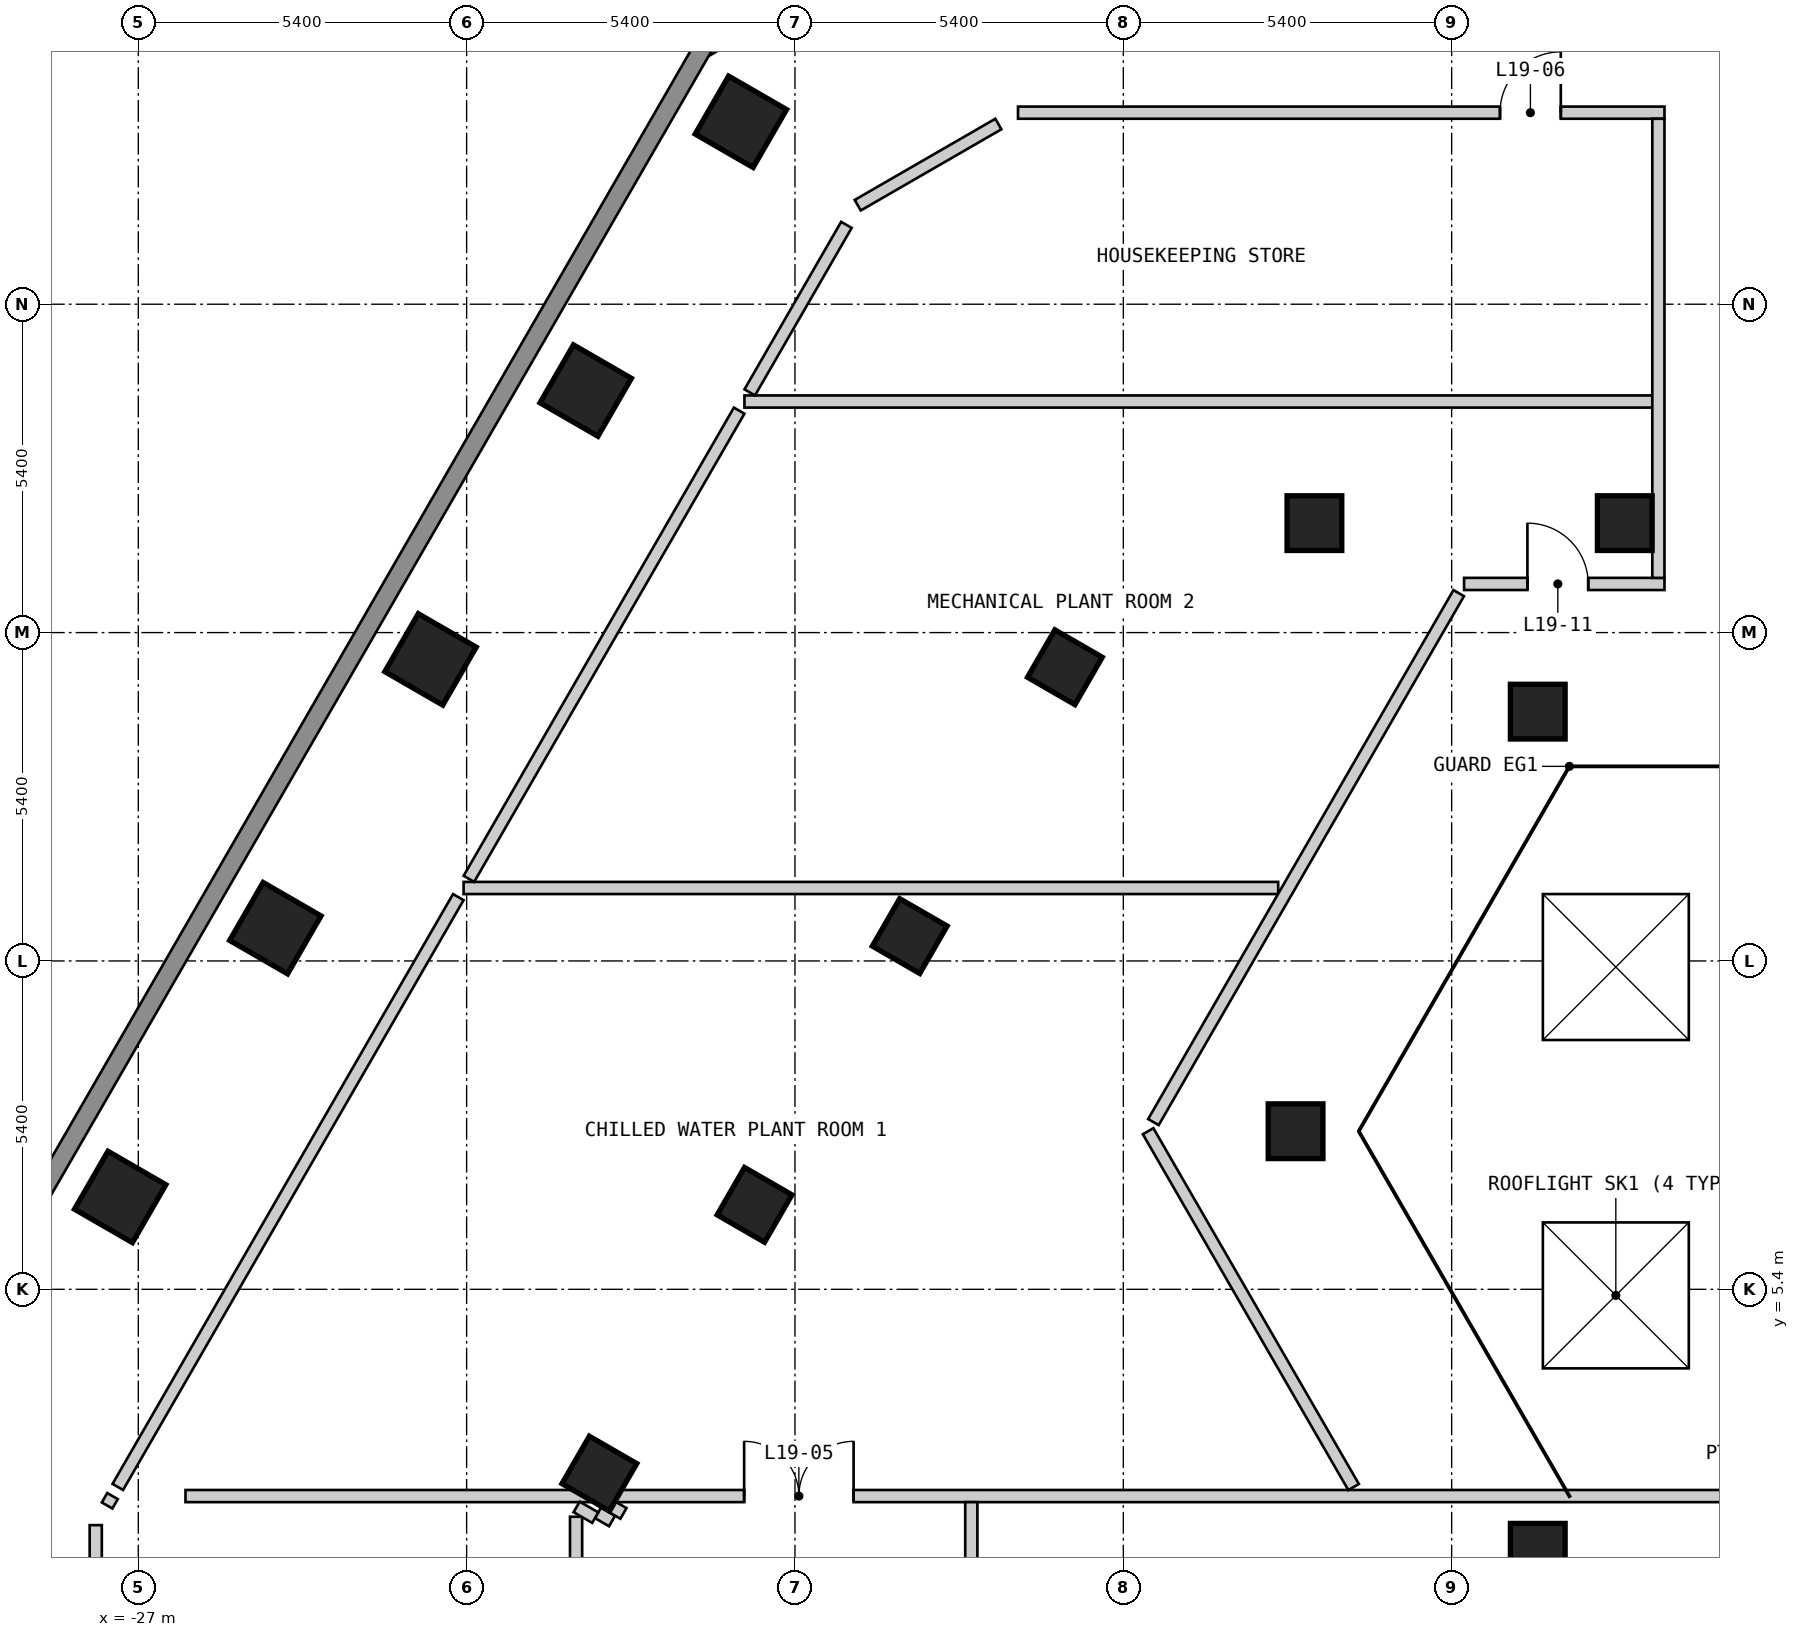
"""IFC4 building model, lengths in metres.
Left out: names, types, materials, properties, quantities, classifications, styles, units other than length and angle.
Written with IfcOpenShell. Run it as: python <this file> out.ifc"""

import sys

from ifc_helpers import new_model, si_unit, direction, frame, frame_2d, origin, origin_2d, place, context, subcontext, project, spatial, polyline, rectangle, outline, extrude, element, fill, save


model = new_model("IFC4")
c1 = context("Model", 3, precision=1e-05, world=origin(), true_north=direction((0.0, 1.0)))
c2 = subcontext(c1, "Body", "Model", "MODEL_VIEW")
j1 = project(units=[si_unit("LENGTHUNIT", "METRE"), si_unit("PLANEANGLEUNIT", "RADIAN")], contexts=[c1])
p1 = place(None, origin())
s1 = spatial("IfcSite", under=j1, at=p1, CompositionType="ELEMENT")
p2 = place(p1, origin())
s2 = spatial("IfcBuilding", under=s1, at=p2, CompositionType="ELEMENT")
p3 = place(p2, frame((0.0, 0.0, 62.4)))
s3 = spatial("IfcBuildingStorey", under=s2, at=p3, CompositionType="ELEMENT", Elevation=62.4)
for number, where, z_axis, x_axis in (
    (1, (-17.09, 24.6, 0.0), (0.0, 0.0, 1.0), (-0.5, -0.866, 0.0)),
    (2, (-19.642, 20.18, 0.0), (0.0, 0.0, 1.0), (-0.5, -0.866, 0.0)),
    (3, (-22.194, 15.759, 0.0), (0.0, 0.0, 1.0), (-0.5, -0.866, 0.0)),
    (4, (-24.746, 11.339, 0.0), (0.0, 0.0, 1.0), (-0.5, -0.866, 0.0)),
    (5, (-27.298, 6.919, 0.0), (0.0, 0.0, 1.0), (-0.5, -0.866, 0.0)),
):
    element("IfcColumn", number, at=place(p3, frame(where, z_axis=z_axis, x_axis=x_axis)), inside=s3, PredefinedType="COLUMN", context=c2, shape_type="SweptSolid", body=[
        extrude(rectangle(XDim=1.1, YDim=1.1, at=origin_2d()), origin(), (0.0, 0.0, 1.0), 3.6),
    ])
p4 = place(p3, frame((-2.553, 18.0, 0.0), z_axis=(0.0, 0.0, 1.0), x_axis=(-1.0, 0.0, 0.0)))
e6 = element("IfcColumn", 6, at=p4, inside=s3, PredefinedType="COLUMN", context=c2, shape_type="SweptSolid", body=[
    extrude(rectangle(XDim=0.9, YDim=0.9, at=origin_2d()), origin(), (0.0, 0.0, 1.0), 2.6),
])
for number, where, z_axis, x_axis in (
    (7, (-3.984, 14.9, 0.0), (0.0, 0.0, 1.0), (1.0, 0.0, 0.0)),
    (8, (-7.657, 18.0, 0.0), (0.0, 0.0, 1.0), (-1.0, 0.0, 0.0)),
    (9, (-11.761, 15.63, 0.0), (0.0, 0.0, 1.0), (-0.5, -0.866, 0.0)),
    (10, (-7.967, 8.0, 0.0), (0.0, 0.0, 1.0), (1.0, 0.0, 0.0)),
    (11, (-14.313, 11.209, 0.0), (0.0, 0.0, 1.0), (-0.5, -0.866, 0.0)),
    (12, (-16.865, 6.789, 0.0), (0.0, 0.0, 1.0), (-0.5, -0.866, 0.0)),
    (13, (-3.984, 1.1, 0.0), (0.0, 0.0, 1.0), (1.0, 0.0, 0.0)),
    (14, (-19.417, 2.369, 0.0), (0.0, 0.0, 1.0), (-0.5, -0.866, 0.0)),
):
    element("IfcColumn", number, at=place(p3, frame(where, z_axis=z_axis, x_axis=x_axis)), inside=s3, PredefinedType="COLUMN", context=c2, shape_type="SweptSolid", body=[
        extrude(rectangle(XDim=0.9, YDim=0.9, at=origin_2d()), origin(), (0.0, 0.0, 1.0), 3.6),
    ])
p5 = place(p3, frame((-13.435, 28.27, 0.0), z_axis=(0.0, 0.0, 1.0), x_axis=(-0.866010750942, -0.50002537861, 0.0)))
e15 = element("IfcWall", 15, at=p5, inside=s3, PredefinedType="SOLIDWALL", context=c2, shape_type="SweptSolid", body=[
    extrude(outline(polyline([(0.0, -0.15), (5.0, -0.15), (4.919, 0.15), (0.08, 0.15), (0.0, -0.15)])), origin(), (0.0, 0.0, 1.0), 2.6),
])
p6 = place(p3, frame((-17.71, 25.825, 0.0), z_axis=(0.0, 0.0, 1.0), x_axis=(-0.500001938803, -0.866024284413, 0.0)))
e16 = element("IfcWall", 16, at=p6, inside=s3, PredefinedType="SOLIDWALL", context=c2, shape_type="SweptSolid", body=[
    extrude(outline(polyline([(0.0, -0.15), (27.02, -0.15), (26.94, 0.15), (0.08, 0.15), (0.0, -0.15)])), origin(), (0.0, 0.0, 1.0), 2.6),
])
p7 = place(p3, frame((-26.224, 2.0, 0.0), z_axis=(0.0, 0.0, 1.0), x_axis=(1.0, 0.0, 0.0)))
e17 = element("IfcWall", 17, at=p7, inside=s3, PredefinedType="SOLIDWALL", context=c2, shape_type="SweptSolid", body=[
    extrude(rectangle(XDim=53.248, YDim=0.2, at=frame_2d((26.624, 0.0))), origin(), (0.0, 0.0, 1.0), 2.6),
])
p8 = place(p7, frame((9.188, 0.0, 0.0)))
e18 = element("IfcOpeningElement", 18, at=p8, cuts=e17, PredefinedType="OPENING", context=c2, shape_type="SweptSolid", body=[
    extrude(rectangle(XDim=1.8, YDim=2.1, at=frame_2d((0.9, 1.05))), frame((0.0, 0.11, 0.0), z_axis=(0.0, -1.0, 0.0), x_axis=(1.0, 0.0, 0.0)), (0.0, 0.0, 1.0), 0.22),
])
p9 = place(p7, frame((40.124, 0.0, 0.0)))
e19 = element("IfcOpeningElement", 19, at=p9, cuts=e17, PredefinedType="OPENING", context=c2, shape_type="SweptSolid", body=[
    extrude(rectangle(XDim=1.0, YDim=2.1, at=frame_2d((0.5, 1.05))), frame((0.0, 0.11, 0.0), z_axis=(0.0, -1.0, 0.0), x_axis=(1.0, 0.0, 0.0)), (0.0, 0.0, 1.0), 0.22),
])
p10 = place(p7, frame((30.811, 0.0, 0.0)))
e20 = element("IfcOpeningElement", 20, at=p10, cuts=e17, PredefinedType="OPENING", context=c2, shape_type="SweptSolid", body=[
    extrude(rectangle(XDim=1.8, YDim=2.1, at=frame_2d((0.9, 1.05))), frame((0.0, 0.11, 0.0), z_axis=(0.0, -1.0, 0.0), x_axis=(1.0, 0.0, 0.0)), (0.0, 0.0, 1.0), 0.22),
])
p11 = place(p3, frame((-21.65, 12.0, 0.0), z_axis=(0.0, 0.0, 1.0), x_axis=(1.0, 0.0, 0.0)))
e21 = element("IfcWall", 21, at=p11, inside=s3, PredefinedType="SOLIDWALL", context=c2, shape_type="SweptSolid", body=[
    extrude(rectangle(XDim=13.397, YDim=0.2, at=frame_2d((6.698, 0.0))), origin(), (0.0, 0.0, 1.0), 2.6),
])
p12 = place(p3, frame((-5.196, 17.0, 0.0), z_axis=(0.0, 0.0, 1.0), x_axis=(1.0, 0.0, 0.0)))
e22 = element("IfcWall", 22, at=p12, inside=s3, PredefinedType="SOLIDWALL", context=c2, shape_type="SweptSolid", body=[
    extrude(rectangle(XDim=3.296, YDim=0.2, at=frame_2d((1.648, 0.0))), origin(), (0.0, 0.0, 1.0), 2.6),
])
p13 = place(p12, frame((1.042, 0.0, 0.0)))
e23 = element("IfcOpeningElement", 23, at=p13, cuts=e22, PredefinedType="OPENING", context=c2, shape_type="SweptSolid", body=[
    extrude(rectangle(XDim=1.0, YDim=2.1, at=frame_2d((0.5, 1.05))), frame((0.0, 0.11, 0.0), z_axis=(0.0, -1.0, 0.0), x_axis=(1.0, 0.0, 0.0)), (0.0, 0.0, 1.0), 0.22),
])
p14 = place(p3, frame((-17.031, 20.0, 0.0), z_axis=(0.0, 0.0, 1.0), x_axis=(1.0, 0.0, 0.0)))
e24 = element("IfcWall", 24, at=p14, inside=s3, PredefinedType="SOLIDWALL", context=c2, shape_type="SweptSolid", body=[
    extrude(rectangle(XDim=14.931, YDim=0.2, at=frame_2d((7.465, 0.0))), origin(), (0.0, 0.0, 1.0), 2.6),
])
p15 = place(p3, frame((-12.532, 24.75, 0.0), z_axis=(0.0, 0.0, 1.0), x_axis=(1.0, 0.0, 0.0)))
e25 = element("IfcWall", 25, at=p15, inside=s3, PredefinedType="PARTITIONING", context=c2, shape_type="SweptSolid", body=[
    extrude(rectangle(XDim=10.632, YDim=0.2, at=frame_2d((5.316, 0.0))), origin(), (0.0, 0.0, 1.0), 2.6),
])
p16 = place(p15, frame((8.927, 0.0, 0.0), z_axis=(0.0, 0.0, 1.0), x_axis=(-1.0, 0.0, 0.0)))
e26 = element("IfcOpeningElement", 26, at=p16, cuts=e25, PredefinedType="OPENING", context=c2, shape_type="SweptSolid", body=[
    extrude(rectangle(XDim=1.0, YDim=2.1, at=frame_2d((0.5, 1.05))), frame((0.0, 0.11, 0.0), z_axis=(0.0, -1.0, 0.0), x_axis=(1.0, 0.0, 0.0)), (0.0, 0.0, 1.0), 0.22),
])
p17 = place(p3, frame((-27.7, -1.522, 0.0), z_axis=(0.0, 0.0, 1.0), x_axis=(0.0, 1.0, 0.0)))
e27 = element("IfcWall", 27, at=p17, inside=s3, PredefinedType="SOLIDWALL", context=c2, shape_type="SweptSolid", body=[
    extrude(rectangle(XDim=3.044, YDim=0.2, at=frame_2d((1.522, 0.0))), origin(), (0.0, 0.0, 1.0), 2.6),
])
p18 = place(p3, frame((-19.8, -8.9, 0.0), z_axis=(0.0, 0.0, 1.0), x_axis=(0.0, 1.0, 0.0)))
e28 = element("IfcWall", 28, at=p18, inside=s3, PredefinedType="SOLIDWALL", context=c2, shape_type="SweptSolid", body=[
    extrude(rectangle(XDim=10.56, YDim=0.2, at=frame_2d((5.28, 0.0))), origin(), (0.0, 0.0, 1.0), 2.6),
])
p19 = place(p18, frame((4.657, 0.0, 0.0)))
e29 = element("IfcOpeningElement", 29, at=p19, cuts=e28, PredefinedType="OPENING", context=c2, shape_type="SweptSolid", body=[
    extrude(rectangle(XDim=1.0, YDim=2.1, at=frame_2d((0.5, 1.05))), frame((0.0, 0.11, 0.0), z_axis=(0.0, -1.0, 0.0), x_axis=(1.0, 0.0, 0.0)), (0.0, 0.0, 1.0), 0.22),
])
p20 = place(p3, frame((-13.3, -4.88, 0.0), z_axis=(0.0, 0.0, 1.0), x_axis=(0.0, 1.0, 0.0)))
e30 = element("IfcWall", 30, at=p20, inside=s3, PredefinedType="PARTITIONING", context=c2, shape_type="SweptSolid", body=[
    extrude(rectangle(XDim=6.78, YDim=0.2, at=frame_2d((3.39, 0.0))), origin(), (0.0, 0.0, 1.0), 2.6),
])
p21 = place(p3, frame((-2.0, 17.1, 0.0), z_axis=(0.0, 0.0, 1.0), x_axis=(0.0, 1.0, 0.0)))
e31 = element("IfcWall", 31, at=p21, inside=s3, PredefinedType="SOLIDWALL", context=c2, shape_type="SweptSolid", body=[
    extrude(rectangle(XDim=7.55, YDim=0.2, at=frame_2d((3.775, 0.0))), origin(), (0.0, 0.0, 1.0), 2.6),
])
p22 = place(p3, frame((-19.44, 1.724, 0.0), z_axis=(0.0, 0.0, 1.0), x_axis=(0.865821204386, -0.500353517061, 0.0)))
e32 = element("IfcWall", 32, at=p22, inside=s3, PredefinedType="SOLIDWALL", context=c2, shape_type="SweptSolid", body=[
    extrude(rectangle(XDim=0.268, YDim=0.2, at=frame_2d((0.134, 0.0))), origin(), (0.0, 0.0, 1.0), 2.6),
])
p23 = place(p3, frame((-19.791, 1.822, 0.0), z_axis=(0.0, 0.0, 1.0), x_axis=(0.865552376308, -0.500818414065, 0.0)))
e33 = element("IfcWall", 33, at=p23, inside=s3, PredefinedType="SOLIDWALL", context=c2, shape_type="SweptSolid", body=[
    extrude(rectangle(XDim=0.354, YDim=0.2, at=frame_2d((0.177, 0.0))), origin(), (0.0, 0.0, 1.0), 2.6),
])
p24 = place(p3, frame((-10.392, 8.0, 0.0), z_axis=(0.0, 0.0, 1.0), x_axis=(0.500051862572, -0.865995458844, 0.0)))
e34 = element("IfcWall", 34, at=p24, inside=s3, PredefinedType="SOLIDWALL", context=c2, shape_type="SweptSolid", body=[
    extrude(rectangle(XDim=6.758, YDim=0.2, at=frame_2d((3.379, 0.0))), origin(), (0.0, 0.0, 1.0), 2.6),
])
p25 = place(p3, frame((-15.168, 23.228, 0.0), z_axis=(0.0, 0.0, 1.0), x_axis=(0.866097299559, 0.499875452184, 0.0)))
e35 = element("IfcWall", 35, at=p25, inside=s3, PredefinedType="PARTITIONING", context=c2, shape_type="SweptSolid", body=[
    extrude(rectangle(XDim=2.671, YDim=0.2, at=frame_2d((1.335, 0.0))), origin(), (0.0, 0.0, 1.0), 2.6),
])
p26 = place(p3, frame((-10.305, 8.15, 0.0), z_axis=(0.0, 0.0, 1.0), x_axis=(0.49988797692, 0.86609007068, 0.0)))
e36 = element("IfcWall", 36, at=p26, inside=s3, PredefinedType="SOLIDWALL", context=c2, shape_type="SweptSolid", body=[
    extrude(rectangle(XDim=10.044, YDim=0.2, at=frame_2d((5.022, 0.0))), origin(), (0.0, 0.0, 1.0), 2.6),
])
p27 = place(p3, frame((-27.513, 1.845, 0.0), z_axis=(0.0, 0.0, 1.0), x_axis=(0.497315560673, 0.867569728098, 0.0)))
e37 = element("IfcWall", 37, at=p27, inside=s3, PredefinedType="SOLIDWALL", context=c2, shape_type="SweptSolid", body=[
    extrude(rectangle(XDim=0.179, YDim=0.2, at=frame_2d((0.089, 0.0))), origin(), (0.0, 0.0, 1.0), 2.6),
])
p28 = place(p3, frame((-27.337, 2.15, 0.0), z_axis=(0.0, 0.0, 1.0), x_axis=(0.499962711661, 0.866046931147, 0.0)))
e38 = element("IfcWall", 38, at=p28, inside=s3, PredefinedType="SOLIDWALL", context=c2, shape_type="SweptSolid", body=[
    extrude(rectangle(XDim=11.2, YDim=0.2, at=frame_2d((5.6, 0.0))), origin(), (0.0, 0.0, 1.0), 2.6),
])
p29 = place(p3, frame((-21.563, 12.15, 0.0), z_axis=(0.0, 0.0, 1.0), x_axis=(0.499945887847, 0.866056643197, 0.0)))
e39 = element("IfcWall", 39, at=p29, inside=s3, PredefinedType="SOLIDWALL", context=c2, shape_type="SweptSolid", body=[
    extrude(rectangle(XDim=8.891, YDim=0.2, at=frame_2d((4.446, 0.0))), origin(), (0.0, 0.0, 1.0), 2.6),
])
p30 = place(p3, frame((-16.944, 20.15, 0.0), z_axis=(0.0, 0.0, 1.0), x_axis=(0.499861973965, 0.866105078489, 0.0)))
e40 = element("IfcWall", 40, at=p30, inside=s3, PredefinedType="PARTITIONING", context=c2, shape_type="SweptSolid", body=[
    extrude(rectangle(XDim=3.181, YDim=0.2, at=frame_2d((1.591, 0.0))), origin(), (0.0, 0.0, 1.0), 2.6),
])
p31 = place(p3, frame((-19.158, 1.677, 0.0), z_axis=(0.0, 0.0, 1.0), x_axis=(0.500036104519, 0.866004557827, 0.0)))
e41 = element("IfcWall", 41, at=p31, inside=s3, PredefinedType="SOLIDWALL", context=c2, shape_type="SweptSolid", body=[
    extrude(rectangle(XDim=0.202, YDim=0.2, at=frame_2d((0.101, 0.0))), origin(), (0.0, 0.0, 1.0), 2.6),
])
p32 = place(p3, frame((0.0, 0.0, -0.4)))
p33 = place(p32, frame((-2.7, 5.3, 0.0)))
p34 = place(p33, frame((0.0, 0.0, 0.35)))
e42 = element("IfcWindow", 42, at=p34, inside=s3, PartitioningType="SINGLE_PANEL", PredefinedType="SKYLIGHT", context=c2, shape_type="SweptSolid", body=[
    extrude(rectangle(XDim=2.4, YDim=2.4, at=origin_2d()), origin(), (0.0, 0.0, 1.0), 0.05),
])
p35 = place(p32, frame((-2.7, 10.7, 0.0)))
p36 = place(p35, frame((0.0, 0.0, 0.35)))
e43 = element("IfcWindow", 43, at=p36, inside=s3, PartitioningType="SINGLE_PANEL", PredefinedType="SKYLIGHT", context=c2, shape_type="SweptSolid", body=[
    extrude(rectangle(XDim=2.4, YDim=2.4, at=origin_2d()), origin(), (0.0, 0.0, 1.0), 0.05),
])
p37 = place(p8, origin())
e44 = element("IfcDoor", 44, at=p37, inside=s3, OperationType="DOUBLE_DOOR_SINGLE_SWING", PredefinedType="DOOR", context=c2, shape_type="SweptSolid", body=[
    extrude(rectangle(XDim=1.8, YDim=2.1, at=frame_2d((0.9, 1.05))), frame((0.0, 0.025, 0.0), z_axis=(0.0, -1.0, 0.0), x_axis=(1.0, 0.0, 0.0)), (0.0, 0.0, 1.0), 0.05),
])
fill(e18, e44)
p38 = place(p16, origin())
e45 = element("IfcDoor", 45, at=p38, inside=s3, OperationType="SINGLE_SWING_LEFT", PredefinedType="DOOR", context=c2, shape_type="SweptSolid", body=[
    extrude(rectangle(XDim=1.0, YDim=2.1, at=frame_2d((0.5, 1.05))), frame((0.0, 0.025, 0.0), z_axis=(0.0, -1.0, 0.0), x_axis=(1.0, 0.0, 0.0)), (0.0, 0.0, 1.0), 0.05),
])
fill(e26, e45)
p39 = place(p13, origin())
e46 = element("IfcDoor", 46, at=p39, inside=s3, OperationType="SINGLE_SWING_LEFT", PredefinedType="DOOR", context=c2, shape_type="SweptSolid", body=[
    extrude(rectangle(XDim=1.0, YDim=2.1, at=frame_2d((0.5, 1.05))), frame((0.0, 0.025, 0.0), z_axis=(0.0, -1.0, 0.0), x_axis=(1.0, 0.0, 0.0)), (0.0, 0.0, 1.0), 0.05),
])
fill(e23, e46)
save(model, sys.argv[1])
